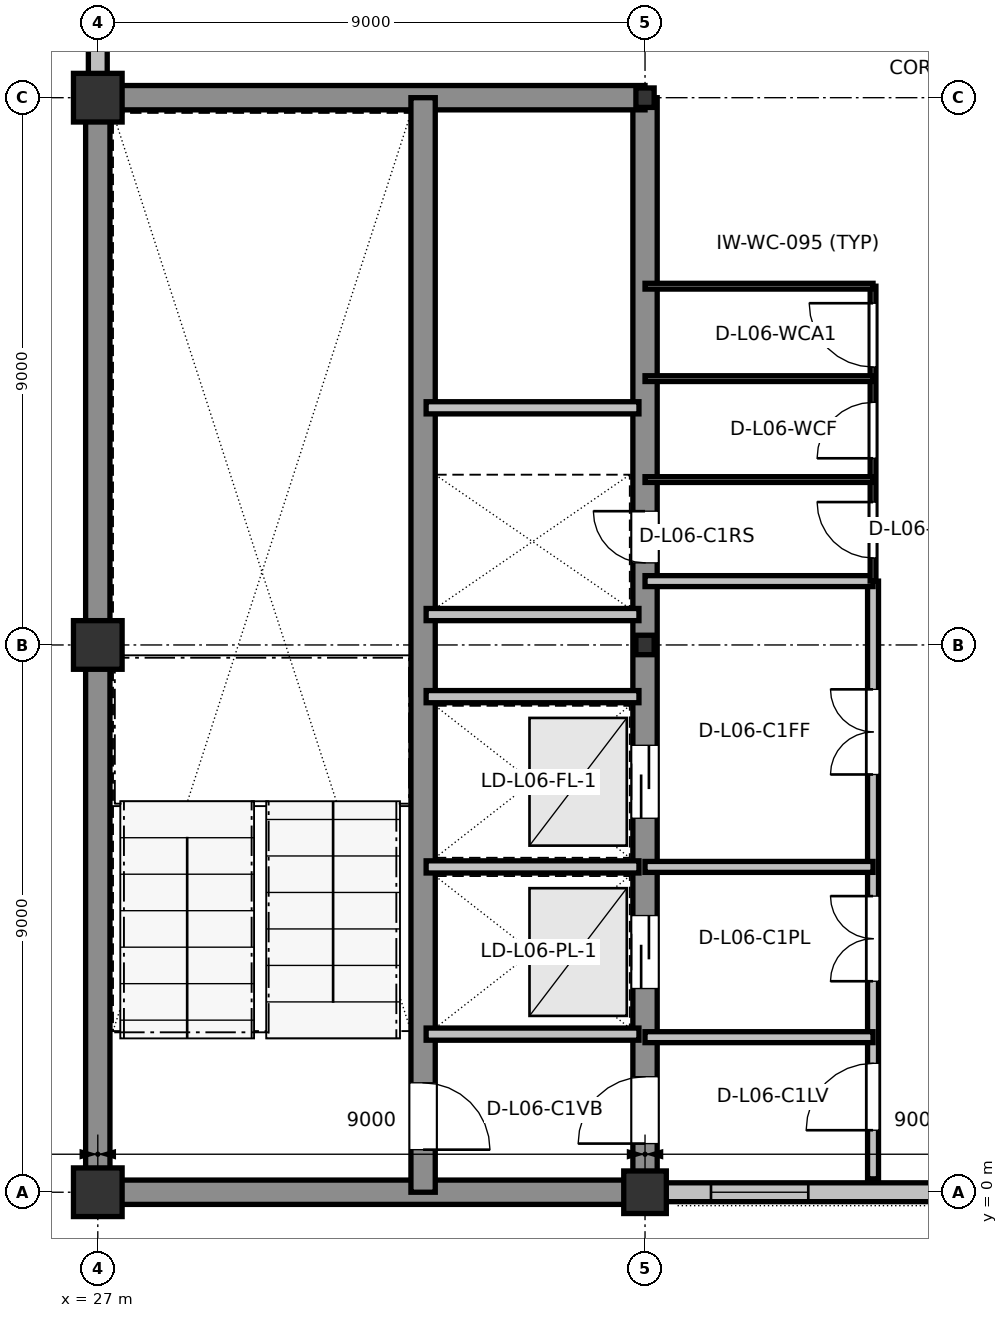
"""IFC4 building model, lengths in metres.
Left out: names, types, materials, properties, quantities, classifications, styles, units other than length and angle.
Written with IfcOpenShell. Run it as: python <this file> out.ifc"""

import sys

from ifc_helpers import new_model, si_unit, direction, frame, frame_2d, origin, origin_2d, place, context, subcontext, project, spatial, rectangle, i_section, extrude, element, fill, save


model = new_model("IFC4")
c1 = context("Model", 3, precision=1e-05, world=origin(), true_north=direction((0.0, 1.0)))
c2 = subcontext(c1, "Body", "Model", "MODEL_VIEW")
j1 = project(units=[si_unit("LENGTHUNIT", "METRE"), si_unit("PLANEANGLEUNIT", "RADIAN")], contexts=[c1])
p1 = place(None, origin())
s1 = spatial("IfcSite", under=j1, at=p1, CompositionType="ELEMENT")
p2 = place(p1, origin())
s2 = spatial("IfcBuilding", under=s1, at=p2, CompositionType="ELEMENT")
p3 = place(p2, frame((0.0, 0.0, 27.6)))
s3 = spatial("IfcBuildingStorey", under=s2, at=p3, CompositionType="ELEMENT", Elevation=27.6)
for number, where, z_axis, x_axis in (
    (1, (27.0, 0.0, 0.0), (0.0, 0.0, 1.0), (1.0, 0.0, 0.0)),
    (2, (27.0, 9.0, 0.0), (0.0, 0.0, 1.0), (1.0, 0.0, 0.0)),
    (3, (27.0, 18.0, 0.0), (0.0, 0.0, 1.0), (1.0, 0.0, 0.0)),
):
    element("IfcColumn", number, at=place(p3, frame(where, z_axis=z_axis, x_axis=x_axis)), inside=s3, PredefinedType="COLUMN", context=c2, shape_type="SweptSolid", body=[
        extrude(rectangle(XDim=0.8, YDim=0.8, at=origin_2d()), origin(), (0.0, 0.0, 1.0), 4.2),
    ])
p4 = place(p3, frame((36.0, 0.0, 0.0), z_axis=(0.0, 0.0, 1.0), x_axis=(1.0, 0.0, 0.0)))
e4 = element("IfcColumn", 4, at=p4, inside=s3, PredefinedType="COLUMN", context=c2, shape_type="SweptSolid", body=[
    extrude(rectangle(XDim=0.7, YDim=0.7, at=origin_2d()), origin(), (0.0, 0.0, 1.0), 4.2),
])
for number, where, z_axis, x_axis in (
    (5, (36.0, 9.0, 0.0), (0.0, 0.0, 1.0), (1.0, 0.0, 0.0)),
    (6, (36.0, 18.0, 0.0), (0.0, 0.0, 1.0), (1.0, 0.0, 0.0)),
):
    element("IfcColumn", number, at=place(p3, frame(where, z_axis=z_axis, x_axis=x_axis)), inside=s3, PredefinedType="COLUMN", context=c2, shape_type="SweptSolid", body=[
        extrude(i_section(OverallWidth=0.3, OverallDepth=0.32, WebThickness=0.011, FlangeThickness=0.021, at=origin_2d()), origin(), (0.0, 0.0, 1.0), 4.2),
    ])
p5 = place(p3, frame((36.335, 0.0, 0.0), z_axis=(0.0, 0.0, 1.0), x_axis=(1.0, 0.0, 0.0)))
e7 = element("IfcWall", 7, at=p5, inside=s3, PredefinedType="STANDARD", context=c2, shape_type="SweptSolid", body=[
    extrude(rectangle(XDim=8.33, YDim=0.31, at=frame_2d((4.165, 0.0))), origin(), (0.0, 0.0, 1.0), 3.715),
])
p6 = place(p5, frame((0.75, 0.0, 0.9)))
e8 = element("IfcOpeningElement", 8, at=p6, cuts=e7, PredefinedType="OPENING", context=c2, shape_type="SweptSolid", body=[
    extrude(rectangle(XDim=1.6, YDim=1.5, at=frame_2d((0.8, 0.75))), frame((0.0, 0.165, 0.0), z_axis=(0.0, -1.0, 0.0), x_axis=(1.0, 0.0, 0.0)), (0.0, 0.0, 1.0), 0.33),
])
p7 = place(p3, frame((27.0, 21.075, 0.0), z_axis=(0.0, 0.0, 1.0), x_axis=(0.0, -1.0, 0.0)))
e9 = element("IfcWall", 9, at=p7, inside=s3, PredefinedType="STANDARD", context=c2, shape_type="SweptSolid", body=[
    extrude(rectangle(XDim=2.69, YDim=0.31, at=frame_2d((1.345, 0.0))), origin(), (0.0, 0.0, 1.0), 3.715),
])
p8 = place(p3, frame((27.0, 0.0, 0.0), z_axis=(0.0, 0.0, 1.0), x_axis=(1.0, 0.0, 0.0)))
e10 = element("IfcWall", 10, at=p8, inside=s3, PredefinedType="SHEAR", context=c2, shape_type="SweptSolid", body=[
    extrude(rectangle(XDim=9.0, YDim=0.4, at=frame_2d((4.5, 0.0))), origin(), (0.0, 0.0, 1.0), 3.96),
])
p9 = place(p3, frame((36.0, 0.0, 0.0), z_axis=(0.0, 0.0, 1.0), x_axis=(0.0, 1.0, 0.0)))
e11 = element("IfcWall", 11, at=p9, inside=s3, PredefinedType="SHEAR", context=c2, shape_type="SweptSolid", body=[
    extrude(rectangle(XDim=18.0, YDim=0.4, at=frame_2d((9.0, 0.0))), origin(), (0.0, 0.0, 1.0), 3.96),
])
p10 = place(p9, frame((0.8, 0.0, 0.0)))
e12 = element("IfcOpeningElement", 12, at=p10, cuts=e11, PredefinedType="OPENING", context=c2, shape_type="SweptSolid", body=[
    extrude(rectangle(XDim=1.1, YDim=2.16, at=frame_2d((0.55, 1.08))), frame((0.0, 0.21, 0.0), z_axis=(0.0, -1.0, 0.0), x_axis=(1.0, 0.0, 0.0)), (0.0, 0.0, 1.0), 0.42),
])
p11 = place(p9, frame((3.35, 0.0, 0.0)))
e13 = element("IfcOpeningElement", 13, at=p11, cuts=e11, PredefinedType="OPENING", context=c2, shape_type="SweptSolid", body=[
    extrude(rectangle(XDim=1.2, YDim=2.2, at=frame_2d((0.6, 1.1))), frame((0.0, 0.21, 0.0), z_axis=(0.0, -1.0, 0.0), x_axis=(1.0, 0.0, 0.0)), (0.0, 0.0, 1.0), 0.42),
])
p12 = place(p9, frame((6.15, 0.0, 0.0)))
e14 = element("IfcOpeningElement", 14, at=p12, cuts=e11, PredefinedType="OPENING", context=c2, shape_type="SweptSolid", body=[
    extrude(rectangle(XDim=1.2, YDim=2.2, at=frame_2d((0.6, 1.1))), frame((0.0, 0.21, 0.0), z_axis=(0.0, -1.0, 0.0), x_axis=(1.0, 0.0, 0.0)), (0.0, 0.0, 1.0), 0.42),
])
p13 = place(p9, frame((10.35, 0.0, 0.0)))
e15 = element("IfcOpeningElement", 15, at=p13, cuts=e11, PredefinedType="OPENING", context=c2, shape_type="SweptSolid", body=[
    extrude(rectangle(XDim=0.85, YDim=2.1, at=frame_2d((0.425, 1.05))), frame((0.0, 0.21, 0.0), z_axis=(0.0, -1.0, 0.0), x_axis=(1.0, 0.0, 0.0)), (0.0, 0.0, 1.0), 0.42),
])
p14 = place(p3, frame((36.0, 18.0, 0.0), z_axis=(0.0, 0.0, 1.0), x_axis=(-1.0, 0.0, 0.0)))
e16 = element("IfcWall", 16, at=p14, inside=s3, PredefinedType="SHEAR", context=c2, shape_type="SweptSolid", body=[
    extrude(rectangle(XDim=9.0, YDim=0.4, at=frame_2d((4.5, 0.0))), origin(), (0.0, 0.0, 1.0), 3.96),
])
p15 = place(p3, frame((27.0, 18.0, 0.0), z_axis=(0.0, 0.0, 1.0), x_axis=(0.0, -1.0, 0.0)))
e17 = element("IfcWall", 17, at=p15, inside=s3, PredefinedType="SHEAR", context=c2, shape_type="SweptSolid", body=[
    extrude(rectangle(XDim=18.0, YDim=0.4, at=frame_2d((9.0, 0.0))), origin(), (0.0, 0.0, 1.0), 3.96),
])
p16 = place(p3, frame((32.35, 0.0, 0.0), z_axis=(0.0, 0.0, 1.0), x_axis=(0.0, 1.0, 0.0)))
e18 = element("IfcWall", 18, at=p16, inside=s3, PredefinedType="SHEAR", context=c2, shape_type="SweptSolid", body=[
    extrude(rectangle(XDim=18.0, YDim=0.4, at=frame_2d((9.0, 0.0))), origin(), (0.0, 0.0, 1.0), 3.96),
])
p17 = place(p16, frame((0.7, 0.0, 0.0)))
e19 = element("IfcOpeningElement", 19, at=p17, cuts=e18, PredefinedType="OPENING", context=c2, shape_type="SweptSolid", body=[
    extrude(rectangle(XDim=1.1, YDim=2.16, at=frame_2d((0.55, 1.08))), frame((0.0, 0.21, 0.0), z_axis=(0.0, -1.0, 0.0), x_axis=(1.0, 0.0, 0.0)), (0.0, 0.0, 1.0), 0.42),
])
for number, where, z_axis, x_axis in (
    (20, (32.4, 2.6, 0.0), (0.0, 0.0, 1.0), (1.0, 0.0, 0.0)),
    (21, (32.4, 5.35, 0.0), (0.0, 0.0, 1.0), (1.0, 0.0, 0.0)),
    (22, (32.4, 8.15, 0.0), (0.0, 0.0, 1.0), (1.0, 0.0, 0.0)),
    (23, (32.4, 9.5, 0.0), (0.0, 0.0, 1.0), (1.0, 0.0, 0.0)),
    (24, (32.4, 12.9, 0.0), (0.0, 0.0, 1.0), (1.0, 0.0, 0.0)),
):
    element("IfcWall", number, at=place(p3, frame(where, z_axis=z_axis, x_axis=x_axis)), inside=s3, PredefinedType="PARTITIONING", context=c2, shape_type="SweptSolid", body=[
        extrude(rectangle(XDim=3.5, YDim=0.2, at=frame_2d((1.75, 0.0))), origin(), (0.0, 0.0, 1.0), 3.96),
    ])
p18 = place(p3, frame((39.75, 0.22, 0.0), z_axis=(0.0, 0.0, 1.0), x_axis=(0.0, 1.0, 0.0)))
e25 = element("IfcWall", 25, at=p18, inside=s3, PredefinedType="PARTITIONING", context=c2, shape_type="SweptSolid", body=[
    extrude(rectangle(XDim=9.83, YDim=0.18, at=frame_2d((4.915, 0.0))), origin(), (0.0, 0.0, 1.0), 3.96),
])
p19 = place(p18, frame((0.8, 0.0, 0.0)))
e26 = element("IfcOpeningElement", 26, at=p19, cuts=e25, PredefinedType="OPENING", context=c2, shape_type="SweptSolid", body=[
    extrude(rectangle(XDim=1.1, YDim=2.16, at=frame_2d((0.55, 1.08))), frame((0.0, 0.1, 0.0), z_axis=(0.0, -1.0, 0.0), x_axis=(1.0, 0.0, 0.0)), (0.0, 0.0, 1.0), 0.2),
])
p20 = place(p18, frame((3.25, 0.0, 0.0)))
e27 = element("IfcOpeningElement", 27, at=p20, cuts=e25, PredefinedType="OPENING", context=c2, shape_type="SweptSolid", body=[
    extrude(rectangle(XDim=1.4, YDim=2.2, at=frame_2d((0.7, 1.1))), frame((0.0, 0.1, 0.0), z_axis=(0.0, -1.0, 0.0), x_axis=(1.0, 0.0, 0.0)), (0.0, 0.0, 1.0), 0.2),
])
p21 = place(p18, frame((6.65, 0.0, 0.0)))
e28 = element("IfcOpeningElement", 28, at=p21, cuts=e25, PredefinedType="OPENING", context=c2, shape_type="SweptSolid", body=[
    extrude(rectangle(XDim=1.4, YDim=2.2, at=frame_2d((0.7, 1.1))), frame((0.0, 0.1, 0.0), z_axis=(0.0, -1.0, 0.0), x_axis=(1.0, 0.0, 0.0)), (0.0, 0.0, 1.0), 0.2),
])
for number, where, z_axis, x_axis in (
    (29, (36.0, 2.55, 0.0), (0.0, 0.0, 1.0), (1.0, 0.0, 0.0)),
    (30, (36.0, 5.35, 0.0), (0.0, 0.0, 1.0), (1.0, 0.0, 0.0)),
    (31, (36.0, 10.05, 0.0), (0.0, 0.0, 1.0), (1.0, 0.0, 0.0)),
):
    element("IfcWall", number, at=place(p3, frame(where, z_axis=z_axis, x_axis=x_axis)), inside=s3, PredefinedType="PARTITIONING", context=c2, shape_type="SweptSolid", body=[
        extrude(rectangle(XDim=3.75, YDim=0.18, at=frame_2d((1.875, 0.0))), origin(), (0.0, 0.0, 1.0), 3.96),
    ])
p22 = place(p3, frame((39.75, 10.05, 0.0), z_axis=(0.0, 0.0, 1.0), x_axis=(0.0, 1.0, 0.0)))
e32 = element("IfcWall", 32, at=p22, inside=s3, PredefinedType="PARTITIONING", context=c2, shape_type="SweptSolid", body=[
    extrude(rectangle(XDim=4.85, YDim=0.095, at=frame_2d((2.425, 0.0))), origin(), (0.0, 0.0, 1.0), 3.96),
])
p23 = place(p22, frame((0.38, 0.0, 0.0)))
e33 = element("IfcOpeningElement", 33, at=p23, cuts=e32, PredefinedType="OPENING", context=c2, shape_type="SweptSolid", body=[
    extrude(rectangle(XDim=0.92, YDim=2.1, at=frame_2d((0.46, 1.05))), frame((0.0, 0.057, 0.0), z_axis=(0.0, -1.0, 0.0), x_axis=(1.0, 0.0, 0.0)), (0.0, 0.0, 1.0), 0.115),
])
p24 = place(p22, frame((2.02, 0.0, 0.0)))
e34 = element("IfcOpeningElement", 34, at=p24, cuts=e32, PredefinedType="OPENING", context=c2, shape_type="SweptSolid", body=[
    extrude(rectangle(XDim=0.92, YDim=2.1, at=frame_2d((0.46, 1.05))), frame((0.0, 0.057, 0.0), z_axis=(0.0, -1.0, 0.0), x_axis=(1.0, 0.0, 0.0)), (0.0, 0.0, 1.0), 0.115),
])
p25 = place(p22, frame((3.52, 0.0, 0.0)))
e35 = element("IfcOpeningElement", 35, at=p25, cuts=e32, PredefinedType="OPENING", context=c2, shape_type="SweptSolid", body=[
    extrude(rectangle(XDim=1.05, YDim=2.13, at=frame_2d((0.525, 1.065))), frame((0.0, 0.057, 0.0), z_axis=(0.0, -1.0, 0.0), x_axis=(1.0, 0.0, 0.0)), (0.0, 0.0, 1.0), 0.115),
])
for number, where, z_axis, x_axis in (
    (36, (36.0, 11.72, 0.0), (0.0, 0.0, 1.0), (1.0, 0.0, 0.0)),
    (37, (36.0, 13.38, 0.0), (0.0, 0.0, 1.0), (1.0, 0.0, 0.0)),
):
    element("IfcWall", number, at=place(p3, frame(where, z_axis=z_axis, x_axis=x_axis)), inside=s3, PredefinedType="PARTITIONING", context=c2, shape_type="SweptSolid", body=[
        extrude(rectangle(XDim=3.75, YDim=0.095, at=frame_2d((1.875, 0.0))), origin(), (0.0, 0.0, 1.0), 3.96),
    ])
p26 = place(p3, frame((36.0, 14.9, 0.0), z_axis=(0.0, 0.0, 1.0), x_axis=(1.0, 0.0, 0.0)))
e38 = element("IfcWall", 38, at=p26, inside=s3, PredefinedType="PARTITIONING", context=c2, shape_type="SweptSolid", body=[
    extrude(rectangle(XDim=3.75, YDim=0.095, at=frame_2d((1.875, 0.0))), origin(), (0.0, 0.0, 1.0), 3.725),
])
p27 = place(p6, origin())
e39 = element("IfcWindow", 39, at=p27, inside=s3, PartitioningType="SINGLE_PANEL", PredefinedType="WINDOW", context=c2, shape_type="SweptSolid", body=[
    extrude(rectangle(XDim=1.6, YDim=1.5, at=frame_2d((0.8, 0.75))), frame((0.0, 0.03, 0.0), z_axis=(0.0, -1.0, 0.0), x_axis=(1.0, 0.0, 0.0)), (0.0, 0.0, 1.0), 0.06),
])
fill(e8, e39)
p28 = place(p17, frame((1.1, 0.0, 0.0), z_axis=(0.0, 0.0, 1.0), x_axis=(-1.0, 0.0, 0.0)))
e40 = element("IfcDoor", 40, at=p28, inside=s3, OperationType="SINGLE_SWING_RIGHT", PredefinedType="DOOR", context=c2, shape_type="SweptSolid", body=[
    extrude(rectangle(XDim=1.1, YDim=2.16, at=frame_2d((0.55, 1.08))), frame((0.0, 0.025, 0.0), z_axis=(0.0, -1.0, 0.0), x_axis=(1.0, 0.0, 0.0)), (0.0, 0.0, 1.0), 0.05),
])
fill(e19, e40)
p29 = place(p10, origin())
e41 = element("IfcDoor", 41, at=p29, inside=s3, OperationType="SINGLE_SWING_LEFT", PredefinedType="DOOR", context=c2, shape_type="SweptSolid", body=[
    extrude(rectangle(XDim=1.1, YDim=2.16, at=frame_2d((0.55, 1.08))), frame((0.0, 0.025, 0.0), z_axis=(0.0, -1.0, 0.0), x_axis=(1.0, 0.0, 0.0)), (0.0, 0.0, 1.0), 0.05),
])
fill(e12, e41)
p30 = place(p11, origin())
e42 = element("IfcDoor", 42, at=p30, inside=s3, OperationType="SLIDING_TO_LEFT", PredefinedType="DOOR", context=c2, shape_type="SweptSolid", body=[
    extrude(rectangle(XDim=1.2, YDim=2.2, at=frame_2d((0.6, 1.1))), frame((0.0, 0.025, 0.0), z_axis=(0.0, -1.0, 0.0), x_axis=(1.0, 0.0, 0.0)), (0.0, 0.0, 1.0), 0.05),
])
fill(e13, e42)
p31 = place(p12, origin())
e43 = element("IfcDoor", 43, at=p31, inside=s3, OperationType="SLIDING_TO_LEFT", PredefinedType="DOOR", context=c2, shape_type="SweptSolid", body=[
    extrude(rectangle(XDim=1.2, YDim=2.2, at=frame_2d((0.6, 1.1))), frame((0.0, 0.025, 0.0), z_axis=(0.0, -1.0, 0.0), x_axis=(1.0, 0.0, 0.0)), (0.0, 0.0, 1.0), 0.05),
])
fill(e14, e43)
p32 = place(p13, origin())
e44 = element("IfcDoor", 44, at=p32, inside=s3, OperationType="SINGLE_SWING_RIGHT", PredefinedType="DOOR", context=c2, shape_type="SweptSolid", body=[
    extrude(rectangle(XDim=0.85, YDim=2.1, at=frame_2d((0.425, 1.05))), frame((0.0, 0.025, 0.0), z_axis=(0.0, -1.0, 0.0), x_axis=(1.0, 0.0, 0.0)), (0.0, 0.0, 1.0), 0.05),
])
fill(e15, e44)
p33 = place(p19, origin())
e45 = element("IfcDoor", 45, at=p33, inside=s3, OperationType="SINGLE_SWING_LEFT", PredefinedType="DOOR", context=c2, shape_type="SweptSolid", body=[
    extrude(rectangle(XDim=1.1, YDim=2.16, at=frame_2d((0.55, 1.08))), frame((0.0, 0.025, 0.0), z_axis=(0.0, -1.0, 0.0), x_axis=(1.0, 0.0, 0.0)), (0.0, 0.0, 1.0), 0.05),
])
fill(e26, e45)
p34 = place(p20, origin())
e46 = element("IfcDoor", 46, at=p34, inside=s3, OperationType="DOUBLE_DOOR_SINGLE_SWING", PredefinedType="DOOR", context=c2, shape_type="SweptSolid", body=[
    extrude(rectangle(XDim=1.4, YDim=2.2, at=frame_2d((0.7, 1.1))), frame((0.0, 0.025, 0.0), z_axis=(0.0, -1.0, 0.0), x_axis=(1.0, 0.0, 0.0)), (0.0, 0.0, 1.0), 0.05),
])
fill(e27, e46)
p35 = place(p21, origin())
e47 = element("IfcDoor", 47, at=p35, inside=s3, OperationType="DOUBLE_DOOR_SINGLE_SWING", PredefinedType="DOOR", context=c2, shape_type="SweptSolid", body=[
    extrude(rectangle(XDim=1.4, YDim=2.2, at=frame_2d((0.7, 1.1))), frame((0.0, 0.025, 0.0), z_axis=(0.0, -1.0, 0.0), x_axis=(1.0, 0.0, 0.0)), (0.0, 0.0, 1.0), 0.05),
])
fill(e28, e47)
p36 = place(p23, origin())
e48 = element("IfcDoor", 48, at=p36, inside=s3, OperationType="SINGLE_SWING_RIGHT", PredefinedType="DOOR", context=c2, shape_type="SweptSolid", body=[
    extrude(rectangle(XDim=0.92, YDim=2.1, at=frame_2d((0.46, 1.05))), frame((0.0, 0.025, 0.0), z_axis=(0.0, -1.0, 0.0), x_axis=(1.0, 0.0, 0.0)), (0.0, 0.0, 1.0), 0.05),
])
fill(e33, e48)
p37 = place(p24, origin())
e49 = element("IfcDoor", 49, at=p37, inside=s3, OperationType="SINGLE_SWING_LEFT", PredefinedType="DOOR", context=c2, shape_type="SweptSolid", body=[
    extrude(rectangle(XDim=0.92, YDim=2.1, at=frame_2d((0.46, 1.05))), frame((0.0, 0.025, 0.0), z_axis=(0.0, -1.0, 0.0), x_axis=(1.0, 0.0, 0.0)), (0.0, 0.0, 1.0), 0.05),
])
fill(e34, e49)
p38 = place(p25, origin())
e50 = element("IfcDoor", 50, at=p38, inside=s3, OperationType="SINGLE_SWING_RIGHT", PredefinedType="DOOR", context=c2, shape_type="SweptSolid", body=[
    extrude(rectangle(XDim=1.05, YDim=2.13, at=frame_2d((0.525, 1.065))), frame((0.0, 0.025, 0.0), z_axis=(0.0, -1.0, 0.0), x_axis=(1.0, 0.0, 0.0)), (0.0, 0.0, 1.0), 0.05),
])
fill(e35, e50)
save(model, sys.argv[1])
